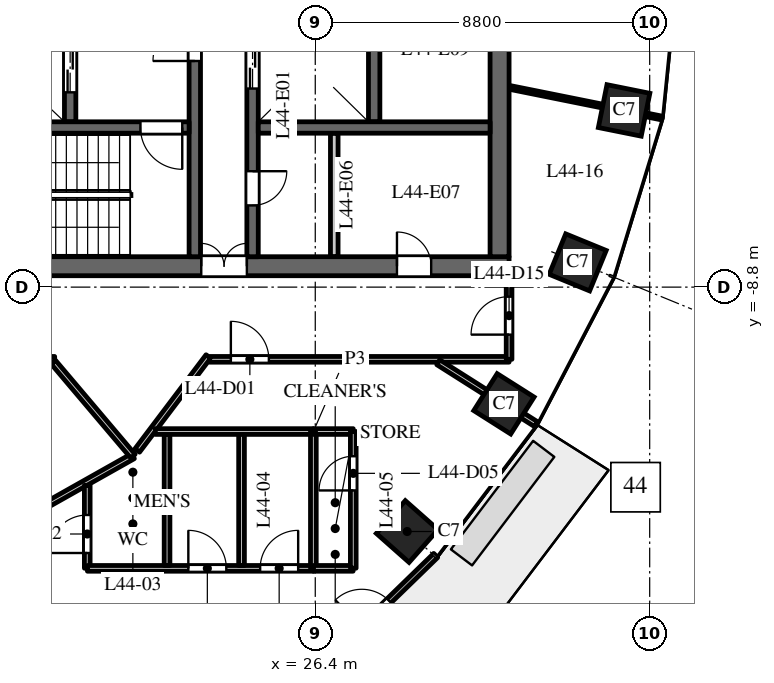
"""IFC4 building model, lengths in metres.
Left out: names, types, materials, properties, quantities, classifications, styles, units other than length and angle.
Written with IfcOpenShell. Run it as: python <this file> out.ifc"""

import sys

from ifc_helpers import new_model, si_unit, direction, frame, frame_2d, origin, origin_2d, place, context, subcontext, project, spatial, rectangle, extrude, element, fill, save


model = new_model("IFC4")
c1 = context("Model", 3, precision=1e-05, world=origin(), true_north=direction((0.0, 1.0)))
c2 = subcontext(c1, "Body", "Model", "MODEL_VIEW")
j1 = project(units=[si_unit("LENGTHUNIT", "METRE"), si_unit("PLANEANGLEUNIT", "RADIAN")], contexts=[c1])
p1 = place(None, origin())
s1 = spatial("IfcSite", under=j1, at=p1, CompositionType="ELEMENT")
p2 = place(p1, origin())
s2 = spatial("IfcBuilding", under=s1, at=p2, CompositionType="ELEMENT")
p3 = place(p2, frame((0.0, 0.0, 190.0)))
s3 = spatial("IfcBuildingStorey", under=s2, at=p3, CompositionType="ELEMENT", Elevation=190.0)
for number, where, z_axis, x_axis in (
    (1, (28.819, -15.23, 0.0), (0.0, 0.0, 1.0), (0.663, 0.749, 0.0)),
    (2, (31.365, -11.871, 0.0), (0.0, 0.0, 1.0), (0.535, 0.845, 0.0)),
    (3, (33.305, -8.149, 0.0), (0.0, 0.0, 1.0), (0.379, 0.925, 0.0)),
    (4, (34.527, -4.151, 0.0), (0.0, 0.0, 1.0), (0.197, 0.98, 0.0)),
):
    element("IfcColumn", number, at=place(p3, frame(where, z_axis=z_axis, x_axis=x_axis)), inside=s3, PredefinedType="COLUMN", context=c2, shape_type="SweptSolid", body=[
        extrude(rectangle(XDim=1.15, YDim=1.15, at=origin_2d()), origin(), (0.0, 0.0, 1.0), 4.0),
    ])
p4 = place(p3, frame((16.5, -8.25, 0.0), z_axis=(0.0, 0.0, 1.0), x_axis=(1.0, 0.0, 0.0)))
e5 = element("IfcWall", 5, at=p4, inside=s3, PredefinedType="SHEAR", context=c2, shape_type="SweptSolid", body=[
    extrude(rectangle(XDim=15.0, YDim=0.5, at=frame_2d((7.5, 0.0))), origin(), (0.0, 0.0, 1.0), 3.7),
])
p5 = place(p4, frame((6.9, 0.0, 0.0)))
e6 = element("IfcOpeningElement", 6, at=p5, cuts=e5, PredefinedType="OPENING", context=c2, shape_type="SweptSolid", body=[
    extrude(rectangle(XDim=1.2, YDim=2.1, at=frame_2d((0.6, 1.05))), frame((0.0, 0.26, 0.0), z_axis=(0.0, -1.0, 0.0), x_axis=(1.0, 0.0, 0.0)), (0.0, 0.0, 1.0), 0.52),
])
p6 = place(p4, frame((12.05, 0.0, 0.0)))
e7 = element("IfcOpeningElement", 7, at=p6, cuts=e5, PredefinedType="OPENING", context=c2, shape_type="SweptSolid", body=[
    extrude(rectangle(XDim=0.9, YDim=2.1, at=frame_2d((0.45, 1.05))), frame((0.0, 0.26, 0.0), z_axis=(0.0, -1.0, 0.0), x_axis=(1.0, 0.0, 0.0)), (0.0, 0.0, 1.0), 0.52),
])
p7 = place(p3, frame((27.95, -4.45, 0.0), z_axis=(0.0, 0.0, 1.0), x_axis=(0.0, 1.0, 0.0)))
e8 = element("IfcWall", 8, at=p7, inside=s3, PredefinedType="SHEAR", context=c2, shape_type="SweptSolid", body=[
    extrude(rectangle(XDim=8.9, YDim=0.3, at=frame_2d((4.45, 0.0))), origin(), (0.0, 0.0, 1.0), 3.7),
])
p8 = place(p3, frame((19.95, -4.45, 0.0), z_axis=(0.0, 0.0, 1.0), x_axis=(0.0, 1.0, 0.0)))
e9 = element("IfcWall", 9, at=p8, inside=s3, PredefinedType="SHEAR", context=c2, shape_type="SweptSolid", body=[
    extrude(rectangle(XDim=8.9, YDim=0.3, at=frame_2d((4.45, 0.0))), origin(), (0.0, 0.0, 1.0), 3.7),
])
p9 = place(p8, frame((0.775, 0.0, 0.0)))
e10 = element("IfcOpeningElement", 10, at=p9, cuts=e9, PredefinedType="OPENING", context=c2, shape_type="SweptSolid", body=[
    extrude(rectangle(XDim=1.2, YDim=2.1, at=frame_2d((0.6, 1.05))), frame((0.0, 0.16, 0.0), z_axis=(0.0, -1.0, 0.0), x_axis=(1.0, 0.0, 0.0)), (0.0, 0.0, 1.0), 0.32),
])
p10 = place(p8, frame((4.675, 0.0, 0.0)))
e11 = element("IfcOpeningElement", 11, at=p10, cuts=e9, PredefinedType="OPENING", context=c2, shape_type="SweptSolid", body=[
    extrude(rectangle(XDim=1.1, YDim=2.1, at=frame_2d((0.55, 1.05))), frame((0.0, 0.16, 0.0), z_axis=(0.0, -1.0, 0.0), x_axis=(1.0, 0.0, 0.0)), (0.0, 0.0, 1.0), 0.32),
])
p11 = place(p8, frame((7.25, 0.0, 0.0)))
e12 = element("IfcOpeningElement", 12, at=p11, cuts=e9, PredefinedType="OPENING", context=c2, shape_type="SweptSolid", body=[
    extrude(rectangle(XDim=1.1, YDim=2.1, at=frame_2d((0.55, 1.05))), frame((0.0, 0.16, 0.0), z_axis=(0.0, -1.0, 0.0), x_axis=(1.0, 0.0, 0.0)), (0.0, 0.0, 1.0), 0.32),
])
p12 = place(p3, frame((24.75, -8.0, 0.0), z_axis=(0.0, 0.0, 1.0), x_axis=(0.0, 1.0, 0.0)))
e13 = element("IfcWall", 13, at=p12, inside=s3, PredefinedType="SHEAR", context=c2, shape_type="SweptSolid", body=[
    extrude(rectangle(XDim=16.0, YDim=0.3, at=frame_2d((8.0, 0.0))), origin(), (0.0, 0.0, 1.0), 3.7),
])
p13 = place(p12, frame((4.425, 0.0, 0.0)))
e14 = element("IfcOpeningElement", 14, at=p13, cuts=e13, PredefinedType="OPENING", context=c2, shape_type="SweptSolid", body=[
    extrude(rectangle(XDim=1.1, YDim=2.1, at=frame_2d((0.55, 1.05))), frame((0.0, 0.16, 0.0), z_axis=(0.0, -1.0, 0.0), x_axis=(1.0, 0.0, 0.0)), (0.0, 0.0, 1.0), 0.32),
])
p14 = place(p12, frame((7.45, 0.0, 0.0)))
e15 = element("IfcOpeningElement", 15, at=p14, cuts=e13, PredefinedType="OPENING", context=c2, shape_type="SweptSolid", body=[
    extrude(rectangle(XDim=1.1, YDim=2.1, at=frame_2d((0.55, 1.05))), frame((0.0, 0.16, 0.0), z_axis=(0.0, -1.0, 0.0), x_axis=(1.0, 0.0, 0.0)), (0.0, 0.0, 1.0), 0.32),
])
p15 = place(p12, frame((10.475, 0.0, 0.0)))
e16 = element("IfcOpeningElement", 16, at=p15, cuts=e13, PredefinedType="OPENING", context=c2, shape_type="SweptSolid", body=[
    extrude(rectangle(XDim=1.1, YDim=2.1, at=frame_2d((0.55, 1.05))), frame((0.0, 0.16, 0.0), z_axis=(0.0, -1.0, 0.0), x_axis=(1.0, 0.0, 0.0)), (0.0, 0.0, 1.0), 0.32),
])
p16 = place(p12, frame((13.75, 0.0, 0.0)))
e17 = element("IfcOpeningElement", 17, at=p16, cuts=e13, PredefinedType="OPENING", context=c2, shape_type="SweptSolid", body=[
    extrude(rectangle(XDim=0.9, YDim=2.1, at=frame_2d((0.45, 1.05))), frame((0.0, 0.16, 0.0), z_axis=(0.0, -1.0, 0.0), x_axis=(1.0, 0.0, 0.0)), (0.0, 0.0, 1.0), 0.32),
])
p17 = place(p12, frame((1.35, 0.0, 0.0)))
e18 = element("IfcOpeningElement", 18, at=p17, cuts=e13, PredefinedType="OPENING", context=c2, shape_type="SweptSolid", body=[
    extrude(rectangle(XDim=0.9, YDim=2.1, at=frame_2d((0.45, 1.05))), frame((0.0, 0.16, 0.0), z_axis=(0.0, -1.0, 0.0), x_axis=(1.0, 0.0, 0.0)), (0.0, 0.0, 1.0), 0.32),
])
p18 = place(p3, frame((31.25, -8.0, 0.0), z_axis=(0.0, 0.0, 1.0), x_axis=(0.0, 1.0, 0.0)))
e19 = element("IfcWall", 19, at=p18, inside=s3, PredefinedType="SHEAR", context=c2, shape_type="SweptSolid", body=[
    extrude(rectangle(XDim=16.0, YDim=0.5, at=frame_2d((8.0, 0.0))), origin(), (0.0, 0.0, 1.0), 3.7),
])
p19 = place(p3, frame((26.9, -8.0, 0.0), z_axis=(0.0, 0.0, 1.0), x_axis=(0.0, 1.0, 0.0)))
e20 = element("IfcWall", 20, at=p19, inside=s3, PredefinedType="PARTITIONING", context=c2, shape_type="SweptSolid", body=[
    extrude(rectangle(XDim=3.25, YDim=0.2, at=frame_2d((1.625, 0.0))), origin(), (0.0, 0.0, 1.0), 3.7),
])
p20 = place(p3, frame((24.9, -4.6, 0.0), z_axis=(0.0, 0.0, 1.0), x_axis=(1.0, 0.0, 0.0)))
e21 = element("IfcWall", 21, at=p20, inside=s3, PredefinedType="SHEAR", context=c2, shape_type="SweptSolid", body=[
    extrude(rectangle(XDim=6.1, YDim=0.3, at=frame_2d((3.05, 0.0))), origin(), (0.0, 0.0, 1.0), 3.7),
])
p21 = place(p3, frame((23.23, -8.0, 0.0), z_axis=(0.0, 0.0, 1.0), x_axis=(0.0, 1.0, 0.0)))
e22 = element("IfcWall", 22, at=p21, inside=s3, PredefinedType="SHEAR", context=c2, shape_type="SweptSolid", body=[
    extrude(rectangle(XDim=7.875, YDim=0.3, at=frame_2d((3.938, 0.0))), origin(), (0.0, 0.0, 1.0), 3.7),
])
p22 = place(p21, frame((5.15, 0.0, 0.0)))
e23 = element("IfcOpeningElement", 23, at=p22, cuts=e22, PredefinedType="OPENING", context=c2, shape_type="SweptSolid", body=[
    extrude(rectangle(XDim=1.1, YDim=2.1, at=frame_2d((0.55, 1.05))), frame((0.0, 0.16, 0.0), z_axis=(0.0, -1.0, 0.0), x_axis=(1.0, 0.0, 0.0)), (0.0, 0.0, 1.0), 0.32),
])
p23 = place(p3, frame((16.9, -4.6, 0.0), z_axis=(0.0, 0.0, 1.0), x_axis=(1.0, 0.0, 0.0)))
e24 = element("IfcWall", 24, at=p23, inside=s3, PredefinedType="SHEAR", context=c2, shape_type="SweptSolid", body=[
    extrude(rectangle(XDim=6.18, YDim=0.3, at=frame_2d((3.09, 0.0))), origin(), (0.0, 0.0, 1.0), 3.7),
])
p24 = place(p23, frame((4.9, 0.0, 0.0)))
e25 = element("IfcOpeningElement", 25, at=p24, cuts=e24, PredefinedType="OPENING", context=c2, shape_type="SweptSolid", body=[
    extrude(rectangle(XDim=1.1, YDim=2.1, at=frame_2d((0.55, 1.05))), frame((0.0, 0.16, 0.0), z_axis=(0.0, -1.0, 0.0), x_axis=(1.0, 0.0, 0.0)), (0.0, 0.0, 1.0), 0.32),
])
p25 = place(p3, frame((26.396, -18.943, 0.0), z_axis=(0.0, 0.0, 1.0), x_axis=(0.717214761864, 0.696852197647, 0.0)))
e26 = element("IfcWall", 26, at=p25, inside=s3, PredefinedType="STANDARD", context=c2, shape_type="SweptSolid", body=[
    extrude(rectangle(XDim=4.424, YDim=0.15, at=frame_2d((2.212, 0.0))), origin(), (0.0, 0.0, 1.0), 3.7),
])
p26 = place(p25, frame((1.712, 0.0, 0.0)))
e27 = element("IfcOpeningElement", 27, at=p26, cuts=e26, PredefinedType="OPENING", context=c2, shape_type="SweptSolid", body=[
    extrude(rectangle(XDim=1.0, YDim=2.4, at=frame_2d((0.5, 1.2))), frame((0.0, 0.085, 0.0), z_axis=(0.0, -1.0, 0.0), x_axis=(1.0, 0.0, 0.0)), (0.0, 0.0, 1.0), 0.17),
])
p27 = place(p3, frame((15.694, -16.577, 0.0), z_axis=(0.0, 0.0, 1.0), x_axis=(0.871255216399, 0.490830263835, 0.0)))
e28 = element("IfcWall", 28, at=p27, inside=s3, PredefinedType="PARTITIONING", context=c2, shape_type="SweptSolid", body=[
    extrude(rectangle(XDim=6.782, YDim=0.15, at=frame_2d((3.391, 0.0))), origin(), (0.0, 0.0, 1.0), 3.7),
])
p28 = place(p3, frame((16.5, -10.7, 0.0), z_axis=(0.0, 0.0, 1.0), x_axis=(1.0, 0.0, 0.0)))
e29 = element("IfcWall", 29, at=p28, inside=s3, PredefinedType="PARTITIONING", context=c2, shape_type="SweptSolid", body=[
    extrude(rectangle(XDim=3.043, YDim=0.15, at=frame_2d((1.521, 0.0))), origin(), (0.0, 0.0, 1.0), 3.7),
])
p29 = place(p3, frame((19.511, -10.778, 0.0), z_axis=(0.0, 0.0, 1.0), x_axis=(0.646314086505, -0.763071491792, 0.0)))
e30 = element("IfcWall", 30, at=p29, inside=s3, PredefinedType="PARTITIONING", context=c2, shape_type="SweptSolid", body=[
    extrude(rectangle(XDim=3.237, YDim=0.15, at=frame_2d((1.618, 0.0))), origin(), (0.0, 0.0, 1.0), 3.7),
])
p30 = place(p3, frame((20.4, -16.196, 0.0), z_axis=(0.0, 0.0, 1.0), x_axis=(0.0, 1.0, 0.0)))
e31 = element("IfcWall", 31, at=p30, inside=s3, PredefinedType="PARTITIONING", context=c2, shape_type="SweptSolid", body=[
    extrude(rectangle(XDim=2.18, YDim=0.15, at=frame_2d((1.09, 0.0))), origin(), (0.0, 0.0, 1.0), 3.7),
])
p31 = place(p30, frame((0.4, 0.0, 0.0)))
e32 = element("IfcOpeningElement", 32, at=p31, cuts=e31, PredefinedType="OPENING", context=c2, shape_type="SweptSolid", body=[
    extrude(rectangle(XDim=1.0, YDim=2.1, at=frame_2d((0.5, 1.05))), frame((0.0, 0.085, 0.0), z_axis=(0.0, -1.0, 0.0), x_axis=(1.0, 0.0, 0.0)), (0.0, 0.0, 1.0), 0.17),
])
p32 = place(p3, frame((20.404, -16.2, 0.0), z_axis=(0.0, 0.0, 1.0), x_axis=(1.0, 0.0, 0.0)))
e33 = element("IfcWall", 33, at=p32, inside=s3, PredefinedType="PARTITIONING", context=c2, shape_type="SweptSolid", body=[
    extrude(rectangle(XDim=5.946, YDim=0.15, at=frame_2d((2.973, 0.0))), origin(), (0.0, 0.0, 1.0), 3.7),
])
p33 = place(p32, frame((2.656, 0.0, 0.0)))
e34 = element("IfcOpeningElement", 34, at=p33, cuts=e33, PredefinedType="OPENING", context=c2, shape_type="SweptSolid", body=[
    extrude(rectangle(XDim=1.0, YDim=2.1, at=frame_2d((0.5, 1.05))), frame((0.0, 0.085, 0.0), z_axis=(0.0, -1.0, 0.0), x_axis=(1.0, 0.0, 0.0)), (0.0, 0.0, 1.0), 0.17),
])
p34 = place(p32, frame((4.546, 0.0, 0.0)))
e35 = element("IfcOpeningElement", 35, at=p34, cuts=e33, PredefinedType="OPENING", context=c2, shape_type="SweptSolid", body=[
    extrude(rectangle(XDim=1.0, YDim=2.1, at=frame_2d((0.5, 1.05))), frame((0.0, 0.085, 0.0), z_axis=(0.0, -1.0, 0.0), x_axis=(1.0, 0.0, 0.0)), (0.0, 0.0, 1.0), 0.17),
])
p35 = place(p3, frame((21.716, -13.098, 0.0), z_axis=(0.0, 0.0, 1.0), x_axis=(0.603132715751, 0.797640851004, 0.0)))
e36 = element("IfcWall", 36, at=p35, inside=s3, PredefinedType="PARTITIONING", context=c2, shape_type="SweptSolid", body=[
    extrude(rectangle(XDim=3.1, YDim=0.15, at=frame_2d((1.55, 0.0))), origin(), (0.0, 0.0, 1.0), 2.75),
])
p36 = place(p3, frame((22.191, -12.6, 0.0), z_axis=(0.0, 0.0, 1.0), x_axis=(1.0, 0.0, 0.0)))
e37 = element("IfcWall", 37, at=p36, inside=s3, PredefinedType="PARTITIONING", context=c2, shape_type="SweptSolid", body=[
    extrude(rectangle(XDim=4.159, YDim=0.15, at=frame_2d((2.08, 0.0))), origin(), (0.0, 0.0, 1.0), 2.75),
])
p37 = place(p3, frame((22.5, -16.125, 0.0), z_axis=(0.0, 0.0, 1.0), x_axis=(0.0, 1.0, 0.0)))
e38 = element("IfcWall", 38, at=p37, inside=s3, PredefinedType="PARTITIONING", context=c2, shape_type="SweptSolid", body=[
    extrude(rectangle(XDim=3.45, YDim=0.15, at=frame_2d((1.725, 0.0))), origin(), (0.0, 0.0, 1.0), 3.7),
])
p38 = place(p3, frame((23.623, -10.7, 0.0), z_axis=(0.0, 0.0, 1.0), x_axis=(1.0, 0.0, 0.0)))
e39 = element("IfcWall", 39, at=p38, inside=s3, PredefinedType="PARTITIONING", context=c2, shape_type="SweptSolid", body=[
    extrude(rectangle(XDim=7.877, YDim=0.15, at=frame_2d((3.938, 0.0))), origin(), (0.0, 0.0, 1.0), 2.9),
])
p39 = place(p38, frame((0.556, 0.0, 0.0)))
e40 = element("IfcOpeningElement", 40, at=p39, cuts=e39, PredefinedType="OPENING", context=c2, shape_type="SweptSolid", body=[
    extrude(rectangle(XDim=1.0, YDim=2.1, at=frame_2d((0.5, 1.05))), frame((0.0, 0.085, 0.0), z_axis=(0.0, -1.0, 0.0), x_axis=(1.0, 0.0, 0.0)), (0.0, 0.0, 1.0), 0.17),
])
p40 = place(p3, frame((24.46, -16.125, 0.0), z_axis=(0.0, 0.0, 1.0), x_axis=(0.0, 1.0, 0.0)))
e41 = element("IfcWall", 41, at=p40, inside=s3, PredefinedType="PARTITIONING", context=c2, shape_type="SweptSolid", body=[
    extrude(rectangle(XDim=3.45, YDim=0.15, at=frame_2d((1.725, 0.0))), origin(), (0.0, 0.0, 1.0), 2.75),
])
p41 = place(p3, frame((26.35, -16.2, 0.0), z_axis=(0.0, 0.0, 1.0), x_axis=(0.0, 1.0, 0.0)))
e42 = element("IfcWall", 42, at=p41, inside=s3, PredefinedType="PARTITIONING", context=c2, shape_type="SweptSolid", body=[
    extrude(rectangle(XDim=3.6, YDim=0.15, at=frame_2d((1.8, 0.0))), origin(), (0.0, 0.0, 1.0), 2.75),
])
p42 = place(p3, frame((26.35, -16.2, 0.0), z_axis=(0.0, 0.0, 1.0), x_axis=(1.0, 0.0, 0.0)))
e43 = element("IfcWall", 43, at=p42, inside=s3, PredefinedType="PARTITIONING", context=c2, shape_type="SweptSolid", body=[
    extrude(rectangle(XDim=1.046, YDim=0.15, at=frame_2d((0.523, 0.0))), origin(), (0.0, 0.0, 1.0), 2.9),
])
p43 = place(p3, frame((26.35, -12.6, 0.0), z_axis=(0.0, 0.0, 1.0), x_axis=(1.0, 0.0, 0.0)))
e44 = element("IfcWall", 44, at=p43, inside=s3, PredefinedType="PARTITIONING", context=c2, shape_type="SweptSolid", body=[
    extrude(rectangle(XDim=1.05, YDim=0.15, at=frame_2d((0.525, 0.0))), origin(), (0.0, 0.0, 1.0), 3.7),
])
p44 = place(p3, frame((27.4, -16.196, 0.0), z_axis=(0.0, 0.0, 1.0), x_axis=(0.0, 1.0, 0.0)))
e45 = element("IfcWall", 45, at=p44, inside=s3, PredefinedType="PARTITIONING", context=c2, shape_type="SweptSolid", body=[
    extrude(rectangle(XDim=3.596, YDim=0.15, at=frame_2d((1.798, 0.0))), origin(), (0.0, 0.0, 1.0), 2.75),
])
p45 = place(p44, frame((2.046, 0.0, 0.0)))
e46 = element("IfcOpeningElement", 46, at=p45, cuts=e45, PredefinedType="OPENING", context=c2, shape_type="SweptSolid", body=[
    extrude(rectangle(XDim=0.9, YDim=2.1, at=frame_2d((0.45, 1.05))), frame((0.0, 0.085, 0.0), z_axis=(0.0, -1.0, 0.0), x_axis=(1.0, 0.0, 0.0)), (0.0, 0.0, 1.0), 0.17),
])
p46 = place(p3, frame((29.637, -10.777, 0.0), z_axis=(0.0, 0.0, 1.0), x_axis=(0.844810627195, -0.535065420467, 0.0)))
e47 = element("IfcWall", 47, at=p46, inside=s3, PredefinedType="PARTITIONING", context=c2, shape_type="SweptSolid", body=[
    extrude(rectangle(XDim=3.048, YDim=0.15, at=frame_2d((1.524, 0.0))), origin(), (0.0, 0.0, 1.0), 2.9),
])
p47 = place(p3, frame((31.5, -10.7, 0.0), z_axis=(0.0, 0.0, 1.0), x_axis=(0.0, 1.0, 0.0)))
e48 = element("IfcWall", 48, at=p47, inside=s3, PredefinedType="PARTITIONING", context=c2, shape_type="SweptSolid", body=[
    extrude(rectangle(XDim=2.2, YDim=0.15, at=frame_2d((1.1, 0.0))), origin(), (0.0, 0.0, 1.0), 2.9),
])
p48 = place(p47, frame((0.65, 0.0, 0.0)))
e49 = element("IfcOpeningElement", 49, at=p48, cuts=e48, PredefinedType="OPENING", context=c2, shape_type="SweptSolid", body=[
    extrude(rectangle(XDim=1.0, YDim=2.1, at=frame_2d((0.5, 1.05))), frame((0.0, 0.085, 0.0), z_axis=(0.0, -1.0, 0.0), x_axis=(1.0, 0.0, 0.0)), (0.0, 0.0, 1.0), 0.17),
])
p49 = place(p3, frame((31.5, -3.542, 0.0), z_axis=(0.0, 0.0, 1.0), x_axis=(0.980357474535, -0.197228857227, 0.0)))
e50 = element("IfcWall", 50, at=p49, inside=s3, PredefinedType="PARTITIONING", context=c2, shape_type="SweptSolid", body=[
    extrude(rectangle(XDim=4.092, YDim=0.1, at=frame_2d((2.046, 0.0))), origin(), (0.0, 0.0, 1.0), 2.9),
])
p50 = place(p9, origin())
e51 = element("IfcDoor", 51, at=p50, inside=s3, OperationType="DOUBLE_DOOR_SLIDING", PredefinedType="DOOR", context=c2, shape_type="SweptSolid", body=[
    extrude(rectangle(XDim=1.2, YDim=2.1, at=frame_2d((0.6, 1.05))), frame((0.0, 0.025, 0.0), z_axis=(0.0, -1.0, 0.0), x_axis=(1.0, 0.0, 0.0)), (0.0, 0.0, 1.0), 0.05),
])
fill(e10, e51)
p51 = place(p13, origin())
e52 = element("IfcDoor", 52, at=p51, inside=s3, OperationType="DOUBLE_DOOR_SLIDING", PredefinedType="DOOR", context=c2, shape_type="SweptSolid", body=[
    extrude(rectangle(XDim=1.1, YDim=2.1, at=frame_2d((0.55, 1.05))), frame((0.0, 0.025, 0.0), z_axis=(0.0, -1.0, 0.0), x_axis=(1.0, 0.0, 0.0)), (0.0, 0.0, 1.0), 0.05),
])
fill(e14, e52)
p52 = place(p24, origin())
e53 = element("IfcDoor", 53, at=p52, inside=s3, OperationType="SINGLE_SWING_RIGHT", PredefinedType="DOOR", context=c2, shape_type="SweptSolid", body=[
    extrude(rectangle(XDim=1.1, YDim=2.1, at=frame_2d((0.55, 1.05))), frame((0.0, 0.025, 0.0), z_axis=(0.0, -1.0, 0.0), x_axis=(1.0, 0.0, 0.0)), (0.0, 0.0, 1.0), 0.05),
])
fill(e25, e53)
p53 = place(p22, origin())
e54 = element("IfcDoor", 54, at=p53, inside=s3, OperationType="SINGLE_SWING_RIGHT", PredefinedType="DOOR", context=c2, shape_type="SweptSolid", body=[
    extrude(rectangle(XDim=1.1, YDim=2.1, at=frame_2d((0.55, 1.05))), frame((0.0, 0.025, 0.0), z_axis=(0.0, -1.0, 0.0), x_axis=(1.0, 0.0, 0.0)), (0.0, 0.0, 1.0), 0.05),
])
fill(e23, e54)
p54 = place(p5, origin())
e55 = element("IfcDoor", 55, at=p54, inside=s3, OperationType="DOUBLE_DOOR_DOUBLE_SWING", PredefinedType="DOOR", context=c2, shape_type="SweptSolid", body=[
    extrude(rectangle(XDim=1.2, YDim=2.1, at=frame_2d((0.6, 1.05))), frame((0.0, 0.025, 0.0), z_axis=(0.0, -1.0, 0.0), x_axis=(1.0, 0.0, 0.0)), (0.0, 0.0, 1.0), 0.05),
])
fill(e6, e55)
p55 = place(p17, origin())
e56 = element("IfcDoor", 56, at=p55, inside=s3, OperationType="SINGLE_SWING_RIGHT", PredefinedType="DOOR", context=c2, shape_type="SweptSolid", body=[
    extrude(rectangle(XDim=0.9, YDim=2.1, at=frame_2d((0.45, 1.05))), frame((0.0, 0.025, 0.0), z_axis=(0.0, -1.0, 0.0), x_axis=(1.0, 0.0, 0.0)), (0.0, 0.0, 1.0), 0.05),
])
fill(e18, e56)
p56 = place(p6, origin())
e57 = element("IfcDoor", 57, at=p56, inside=s3, OperationType="SINGLE_SWING_RIGHT", PredefinedType="DOOR", context=c2, shape_type="SweptSolid", body=[
    extrude(rectangle(XDim=0.9, YDim=2.1, at=frame_2d((0.45, 1.05))), frame((0.0, 0.025, 0.0), z_axis=(0.0, -1.0, 0.0), x_axis=(1.0, 0.0, 0.0)), (0.0, 0.0, 1.0), 0.05),
])
fill(e7, e57)
p57 = place(p26, origin())
e58 = element("IfcDoor", 58, at=p57, inside=s3, OperationType="SINGLE_SWING_LEFT", PredefinedType="DOOR", context=c2, shape_type="SweptSolid", body=[
    extrude(rectangle(XDim=1.0, YDim=2.4, at=frame_2d((0.5, 1.2))), frame((0.0, 0.025, 0.0), z_axis=(0.0, -1.0, 0.0), x_axis=(1.0, 0.0, 0.0)), (0.0, 0.0, 1.0), 0.05),
])
fill(e27, e58)
p58 = place(p39, origin())
e59 = element("IfcDoor", 59, at=p58, inside=s3, OperationType="SINGLE_SWING_LEFT", PredefinedType="DOOR", context=c2, shape_type="SweptSolid", body=[
    extrude(rectangle(XDim=1.0, YDim=2.1, at=frame_2d((0.5, 1.05))), frame((0.0, 0.025, 0.0), z_axis=(0.0, -1.0, 0.0), x_axis=(1.0, 0.0, 0.0)), (0.0, 0.0, 1.0), 0.05),
])
fill(e40, e59)
p59 = place(p31, origin())
e60 = element("IfcDoor", 60, at=p59, inside=s3, OperationType="SINGLE_SWING_LEFT", PredefinedType="DOOR", context=c2, shape_type="SweptSolid", body=[
    extrude(rectangle(XDim=1.0, YDim=2.1, at=frame_2d((0.5, 1.05))), frame((0.0, 0.025, 0.0), z_axis=(0.0, -1.0, 0.0), x_axis=(1.0, 0.0, 0.0)), (0.0, 0.0, 1.0), 0.05),
])
fill(e32, e60)
p60 = place(p33, origin())
e61 = element("IfcDoor", 61, at=p60, inside=s3, OperationType="SINGLE_SWING_LEFT", PredefinedType="DOOR", context=c2, shape_type="SweptSolid", body=[
    extrude(rectangle(XDim=1.0, YDim=2.1, at=frame_2d((0.5, 1.05))), frame((0.0, 0.025, 0.0), z_axis=(0.0, -1.0, 0.0), x_axis=(1.0, 0.0, 0.0)), (0.0, 0.0, 1.0), 0.05),
])
fill(e34, e61)
p61 = place(p34, origin())
e62 = element("IfcDoor", 62, at=p61, inside=s3, OperationType="SINGLE_SWING_RIGHT", PredefinedType="DOOR", context=c2, shape_type="SweptSolid", body=[
    extrude(rectangle(XDim=1.0, YDim=2.1, at=frame_2d((0.5, 1.05))), frame((0.0, 0.025, 0.0), z_axis=(0.0, -1.0, 0.0), x_axis=(1.0, 0.0, 0.0)), (0.0, 0.0, 1.0), 0.05),
])
fill(e35, e62)
p62 = place(p45, origin())
e63 = element("IfcDoor", 63, at=p62, inside=s3, OperationType="SINGLE_SWING_LEFT", PredefinedType="DOOR", context=c2, shape_type="SweptSolid", body=[
    extrude(rectangle(XDim=0.9, YDim=2.1, at=frame_2d((0.45, 1.05))), frame((0.0, 0.025, 0.0), z_axis=(0.0, -1.0, 0.0), x_axis=(1.0, 0.0, 0.0)), (0.0, 0.0, 1.0), 0.05),
])
fill(e46, e63)
p63 = place(p48, origin())
e64 = element("IfcDoor", 64, at=p63, inside=s3, OperationType="SINGLE_SWING_LEFT", PredefinedType="DOOR", context=c2, shape_type="SweptSolid", body=[
    extrude(rectangle(XDim=1.0, YDim=2.1, at=frame_2d((0.5, 1.05))), frame((0.0, 0.025, 0.0), z_axis=(0.0, -1.0, 0.0), x_axis=(1.0, 0.0, 0.0)), (0.0, 0.0, 1.0), 0.05),
])
fill(e49, e64)
save(model, sys.argv[1])
